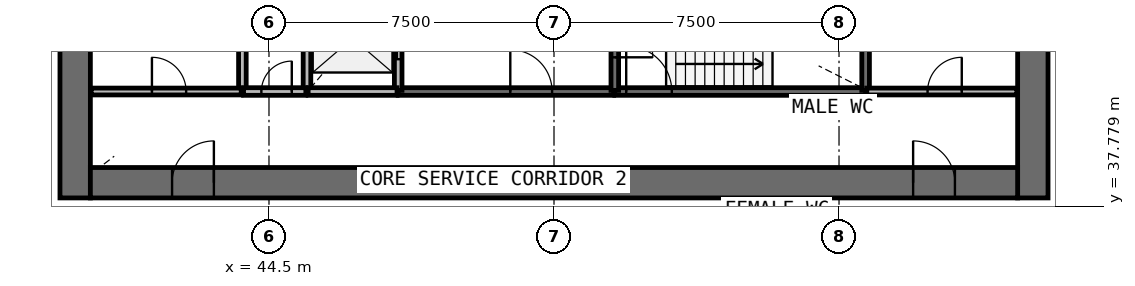
"""IFC4 building model, lengths in metres.
Left out: names, types, materials, properties, quantities, classifications, styles, units other than length and angle.
Written with IfcOpenShell. Run it as: python <this file> out.ifc"""

import sys

from ifc_helpers import new_model, si_unit, direction, frame, frame_2d, origin, place, context, subcontext, project, spatial, rectangle, extrude, source, transform, mapped, element, fill, save


model = new_model("IFC4")
c1 = context("Model", 3, precision=1e-05, world=origin(), true_north=direction((0.0, 1.0)))
c2 = subcontext(c1, "Body", "Model", "MODEL_VIEW")
j1 = project(units=[si_unit("LENGTHUNIT", "METRE"), si_unit("PLANEANGLEUNIT", "RADIAN")], contexts=[c1])
p1 = place(None, origin())
s1 = spatial("IfcSite", under=j1, at=p1, CompositionType="ELEMENT")
p2 = place(p1, origin())
s2 = spatial("IfcBuilding", under=s1, at=p2, CompositionType="ELEMENT")
p3 = place(p2, frame((0.0, 0.0, 96.2)))
s3 = spatial("IfcBuildingStorey", under=s2, at=p3, CompositionType="ELEMENT", Elevation=96.2)
p4 = place(p3, frame((64.6, 38.0, 0.0), z_axis=(0.0, 0.0, 1.0), x_axis=(0.0, 1.0, 0.0)))
e1 = element("IfcWall", 1, at=p4, inside=s3, PredefinedType="SHEAR", context=c2, shape_type="SweptSolid", body=[
    extrude(rectangle(XDim=20.0, YDim=0.8, at=frame_2d((10.0, 0.0))), origin(), (0.0, 0.0, 1.0), 4.1),
])
p5 = place(p4, frame((9.1, 0.0, 0.0)))
e2 = element("IfcOpeningElement", 2, at=p5, cuts=e1, PredefinedType="OPENING", context=c2, shape_type="SweptSolid", body=[
    extrude(rectangle(XDim=1.8, YDim=2.1, at=frame_2d((0.9, 1.05))), frame((0.0, 0.41, 0.0), z_axis=(0.0, -1.0, 0.0), x_axis=(1.0, 0.0, 0.0)), (0.0, 0.0, 1.0), 0.82),
])
p6 = place(p3, frame((39.4, 58.0, 0.0), z_axis=(0.0, 0.0, 1.0), x_axis=(0.0, -1.0, 0.0)))
e3 = element("IfcWall", 3, at=p6, inside=s3, PredefinedType="SHEAR", context=c2, shape_type="SweptSolid", body=[
    extrude(rectangle(XDim=20.0, YDim=0.8, at=frame_2d((10.0, 0.0))), origin(), (0.0, 0.0, 1.0), 4.1),
])
p7 = place(p6, frame((9.1, 0.0, 0.0)))
e4 = element("IfcOpeningElement", 4, at=p7, cuts=e3, PredefinedType="OPENING", context=c2, shape_type="SweptSolid", body=[
    extrude(rectangle(XDim=1.8, YDim=2.1, at=frame_2d((0.9, 1.05))), frame((0.0, 0.41, 0.0), z_axis=(0.0, -1.0, 0.0), x_axis=(1.0, 0.0, 0.0)), (0.0, 0.0, 1.0), 0.82),
])
p8 = place(p3, frame((39.8, 38.4, 0.0), z_axis=(0.0, 0.0, 1.0), x_axis=(1.0, 0.0, 0.0)))
e5 = element("IfcWall", 5, at=p8, inside=s3, PredefinedType="SHEAR", context=c2, shape_type="SweptSolid", body=[
    extrude(rectangle(XDim=24.4, YDim=0.8, at=frame_2d((12.2, 0.0))), origin(), (0.0, 0.0, 1.0), 4.1),
])
p9 = place(p8, frame((21.65, 0.0, 0.0)))
e6 = element("IfcOpeningElement", 6, at=p9, cuts=e5, PredefinedType="OPENING", context=c2, shape_type="SweptSolid", body=[
    extrude(rectangle(XDim=1.1, YDim=2.1, at=frame_2d((0.55, 1.05))), frame((0.0, 0.41, 0.0), z_axis=(0.0, -1.0, 0.0), x_axis=(1.0, 0.0, 0.0)), (0.0, 0.0, 1.0), 0.82),
])
p10 = place(p8, frame((2.15, 0.0, 0.0)))
e7 = element("IfcOpeningElement", 7, at=p10, cuts=e5, PredefinedType="OPENING", context=c2, shape_type="SweptSolid", body=[
    extrude(rectangle(XDim=1.1, YDim=2.1, at=frame_2d((0.55, 1.05))), frame((0.0, 0.41, 0.0), z_axis=(0.0, -1.0, 0.0), x_axis=(1.0, 0.0, 0.0)), (0.0, 0.0, 1.0), 0.82),
])
p11 = place(p3, frame((53.6, 40.8, 0.0), z_axis=(0.0, 0.0, 1.0), x_axis=(1.0, 0.0, 0.0)))
e8 = element("IfcWall", 8, at=p11, inside=s3, PredefinedType="SOLIDWALL", context=c2, shape_type="SweptSolid", body=[
    extrude(rectangle(XDim=6.6, YDim=0.2, at=frame_2d((3.3, 0.0))), origin(), (0.0, 0.0, 1.0), 3.7),
])
p12 = place(p11, frame((0.3, 0.0, 0.0)))
e9 = element("IfcOpeningElement", 9, at=p12, cuts=e8, PredefinedType="OPENING", context=c2, shape_type="SweptSolid", body=[
    extrude(rectangle(XDim=1.2, YDim=2.1, at=frame_2d((0.6, 1.05))), frame((0.0, 0.11, 0.0), z_axis=(0.0, -1.0, 0.0), x_axis=(1.0, 0.0, 0.0)), (0.0, 0.0, 1.0), 0.22),
])
p13 = place(p3, frame((47.9, 40.8, 0.0), z_axis=(0.0, 0.0, 1.0), x_axis=(1.0, 0.0, 0.0)))
e10 = element("IfcWall", 10, at=p13, inside=s3, PredefinedType="SOLIDWALL", context=c2, shape_type="SweptSolid", body=[
    extrude(rectangle(XDim=5.67, YDim=0.2, at=frame_2d((2.835, 0.0))), origin(), (0.0, 0.0, 1.0), 3.7),
])
p14 = place(p13, frame((2.95, 0.0, 0.0)))
e11 = element("IfcOpeningElement", 11, at=p14, cuts=e10, PredefinedType="OPENING", context=c2, shape_type="SweptSolid", body=[
    extrude(rectangle(XDim=1.1, YDim=2.1, at=frame_2d((0.55, 1.05))), frame((0.0, 0.11, 0.0), z_axis=(0.0, -1.0, 0.0), x_axis=(1.0, 0.0, 0.0)), (0.0, 0.0, 1.0), 0.22),
])
for number, where, z_axis, x_axis in (
    (12, (43.8, 43.6, 0.0), (0.0, 0.0, 1.0), (0.0, -1.0, 0.0)),
    (13, (45.5, 43.6, 0.0), (0.0, 0.0, 1.0), (0.0, -1.0, 0.0)),
):
    element("IfcWall", number, at=place(p3, frame(where, z_axis=z_axis, x_axis=x_axis)), inside=s3, PredefinedType="SOLIDWALL", context=c2, shape_type="SweptSolid", body=[
        extrude(rectangle(XDim=2.8, YDim=0.2, at=frame_2d((1.4, 0.0))), origin(), (0.0, 0.0, 1.0), 3.7),
    ])
p15 = place(p3, frame((47.9, 40.83, 0.0), z_axis=(0.0, 0.0, 1.0), x_axis=(0.0, 1.0, 0.0)))
e14 = element("IfcWall", 14, at=p15, inside=s3, PredefinedType="SOLIDWALL", context=c2, shape_type="SweptSolid", body=[
    extrude(rectangle(XDim=2.77, YDim=0.2, at=frame_2d((1.385, 0.0))), origin(), (0.0, 0.0, 1.0), 3.7),
])
p16 = place(p15, frame((0.82, 0.0, 0.0)))
e15 = element("IfcOpeningElement", 15, at=p16, cuts=e14, PredefinedType="OPENING", context=c2, shape_type="SweptSolid", body=[
    extrude(rectangle(XDim=1.1, YDim=2.1, at=frame_2d((0.55, 1.05))), frame((0.0, 0.11, 0.0), z_axis=(0.0, -1.0, 0.0), x_axis=(1.0, 0.0, 0.0)), (0.0, 0.0, 1.0), 0.22),
])
p17 = place(p3, frame((60.2, 40.83, 0.0), z_axis=(0.0, 0.0, 1.0), x_axis=(0.0, 1.0, 0.0)))
e16 = element("IfcWall", 16, at=p17, inside=s3, PredefinedType="SOLIDWALL", context=c2, shape_type="SweptSolid", body=[
    extrude(rectangle(XDim=2.77, YDim=0.2, at=frame_2d((1.385, 0.0))), origin(), (0.0, 0.0, 1.0), 3.7),
])
p18 = place(p3, frame((53.6, 43.6, 0.0), z_axis=(0.0, 0.0, 1.0), x_axis=(0.0, -1.0, 0.0)))
e17 = element("IfcWall", 17, at=p18, inside=s3, PredefinedType="SOLIDWALL", context=c2, shape_type="SweptSolid", body=[
    extrude(rectangle(XDim=2.77, YDim=0.2, at=frame_2d((1.385, 0.0))), origin(), (0.0, 0.0, 1.0), 3.7),
])
p19 = place(p18, frame((0.9, 0.0, 0.0)))
e18 = element("IfcOpeningElement", 18, at=p19, cuts=e17, PredefinedType="OPENING", context=c2, shape_type="SweptSolid", body=[
    extrude(rectangle(XDim=1.0, YDim=2.1, at=frame_2d((0.5, 1.05))), frame((0.0, 0.11, 0.0), z_axis=(0.0, -1.0, 0.0), x_axis=(1.0, 0.0, 0.0)), (0.0, 0.0, 1.0), 0.22),
])
p20 = place(p3, frame((45.53, 40.8, 0.0), z_axis=(0.0, 0.0, 1.0), x_axis=(1.0, 0.0, 0.0)))
e19 = element("IfcWall", 19, at=p20, inside=s3, PredefinedType="SOLIDWALL", context=c2, shape_type="SweptSolid", body=[
    extrude(rectangle(XDim=2.34, YDim=0.2, at=frame_2d((1.17, 0.0))), origin(), (0.0, 0.0, 1.0), 3.7),
])
p21 = place(p3, frame((43.83, 40.8, 0.0), z_axis=(0.0, 0.0, 1.0), x_axis=(1.0, 0.0, 0.0)))
e20 = element("IfcWall", 20, at=p21, inside=s3, PredefinedType="SOLIDWALL", context=c2, shape_type="SweptSolid", body=[
    extrude(rectangle(XDim=1.64, YDim=0.2, at=frame_2d((0.82, 0.0))), origin(), (0.0, 0.0, 1.0), 3.7),
])
p22 = place(p21, frame((0.47, 0.0, 0.0)))
e21 = element("IfcOpeningElement", 21, at=p22, cuts=e20, PredefinedType="OPENING", context=c2, shape_type="SweptSolid", body=[
    extrude(rectangle(XDim=0.8, YDim=2.1, at=frame_2d((0.4, 1.05))), frame((0.0, 0.11, 0.0), z_axis=(0.0, -1.0, 0.0), x_axis=(1.0, 0.0, 0.0)), (0.0, 0.0, 1.0), 0.22),
])
p23 = place(p3, frame((60.23, 40.8, 0.0), z_axis=(0.0, 0.0, 1.0), x_axis=(1.0, 0.0, 0.0)))
e22 = element("IfcWall", 22, at=p23, inside=s3, PredefinedType="PARTITIONING", context=c2, shape_type="SweptSolid", body=[
    extrude(rectangle(XDim=3.95, YDim=0.18, at=frame_2d((1.975, 0.0))), origin(), (0.0, 0.0, 1.0), 3.7),
])
p24 = place(p23, frame((1.6, 0.0, 0.0)))
e23 = element("IfcOpeningElement", 23, at=p24, cuts=e22, PredefinedType="OPENING", context=c2, shape_type="SweptSolid", body=[
    extrude(rectangle(XDim=0.9, YDim=2.1, at=frame_2d((0.45, 1.05))), frame((0.0, 0.1, 0.0), z_axis=(0.0, -1.0, 0.0), x_axis=(1.0, 0.0, 0.0)), (0.0, 0.0, 1.0), 0.2),
])
p25 = place(p3, frame((39.82, 40.8, 0.0), z_axis=(0.0, 0.0, 1.0), x_axis=(1.0, 0.0, 0.0)))
e24 = element("IfcWall", 24, at=p25, inside=s3, PredefinedType="PARTITIONING", context=c2, shape_type="SweptSolid", body=[
    extrude(rectangle(XDim=3.95, YDim=0.18, at=frame_2d((1.975, 0.0))), origin(), (0.0, 0.0, 1.0), 3.7),
])
p26 = place(p25, frame((1.6, 0.0, 0.0)))
e25 = element("IfcOpeningElement", 25, at=p26, cuts=e24, PredefinedType="OPENING", context=c2, shape_type="SweptSolid", body=[
    extrude(rectangle(XDim=0.9, YDim=2.1, at=frame_2d((0.45, 1.05))), frame((0.0, 0.1, 0.0), z_axis=(0.0, -1.0, 0.0), x_axis=(1.0, 0.0, 0.0)), (0.0, 0.0, 1.0), 0.2),
])
m1 = source(origin(), c2, "Body", "SweptSolid", [
    extrude(rectangle(XDim=1.1, YDim=2.1, at=frame_2d((0.55, 1.05))), frame((0.0, 0.025, 0.0), z_axis=(0.0, -1.0, 0.0), x_axis=(1.0, 0.0, 0.0)), (0.0, 0.0, 1.0), 0.05),
])
p27 = place(p16, origin())
e26 = element("IfcDoor", 26, at=p27, inside=s3, OperationType="DOUBLE_DOOR_SLIDING", PredefinedType="USERDEFINED", context=c2, shape_type="MappedRepresentation", body=[
    mapped(m1, transform((0.0, 0.0, 0.0), scale=1.0)),
])
fill(e15, e26)
m2 = source(origin(), c2, "Body", "SweptSolid", [
    extrude(rectangle(XDim=1.2, YDim=2.1, at=frame_2d((0.6, 1.05))), frame((0.0, 0.025, 0.0), z_axis=(0.0, -1.0, 0.0), x_axis=(1.0, 0.0, 0.0)), (0.0, 0.0, 1.0), 0.05),
])
p28 = place(p12, origin())
e27 = element("IfcDoor", 27, at=p28, inside=s3, OperationType="SINGLE_SWING_LEFT", PredefinedType="DOOR", context=c2, shape_type="MappedRepresentation", body=[
    mapped(m2, transform((0.0, 0.0, 0.0), scale=1.0)),
])
fill(e9, e27)
m3 = source(origin(), c2, "Body", "SweptSolid", [
    extrude(rectangle(XDim=1.0, YDim=2.1, at=frame_2d((0.5, 1.05))), frame((0.0, 0.025, 0.0), z_axis=(0.0, -1.0, 0.0), x_axis=(1.0, 0.0, 0.0)), (0.0, 0.0, 1.0), 0.05),
])
p29 = place(p19, origin())
e28 = element("IfcDoor", 28, at=p29, inside=s3, OperationType="SINGLE_SWING_RIGHT", PredefinedType="DOOR", context=c2, shape_type="MappedRepresentation", body=[
    mapped(m3, transform((0.0, 0.0, 0.0), scale=1.0)),
])
fill(e18, e28)
m4 = source(origin(), c2, "Body", "SweptSolid", [
    extrude(rectangle(XDim=1.1, YDim=2.1, at=frame_2d((0.55, 1.05))), frame((0.0, 0.025, 0.0), z_axis=(0.0, -1.0, 0.0), x_axis=(1.0, 0.0, 0.0)), (0.0, 0.0, 1.0), 0.05),
])
p30 = place(p14, origin())
e29 = element("IfcDoor", 29, at=p30, inside=s3, OperationType="SINGLE_SWING_LEFT", PredefinedType="DOOR", context=c2, shape_type="MappedRepresentation", body=[
    mapped(m4, transform((0.0, 0.0, 0.0), scale=1.0)),
])
fill(e11, e29)
m5 = source(origin(), c2, "Body", "SweptSolid", [
    extrude(rectangle(XDim=0.8, YDim=2.1, at=frame_2d((0.4, 1.05))), frame((0.0, 0.025, 0.0), z_axis=(0.0, -1.0, 0.0), x_axis=(1.0, 0.0, 0.0)), (0.0, 0.0, 1.0), 0.05),
])
p31 = place(p22, origin())
e30 = element("IfcDoor", 30, at=p31, inside=s3, OperationType="SINGLE_SWING_RIGHT", PredefinedType="DOOR", context=c2, shape_type="MappedRepresentation", body=[
    mapped(m5, transform((0.0, 0.0, 0.0), scale=1.0)),
])
fill(e21, e30)
m6 = source(origin(), c2, "Body", "SweptSolid", [
    extrude(rectangle(XDim=1.1, YDim=2.1, at=frame_2d((0.55, 1.05))), frame((0.0, 0.025, 0.0), z_axis=(0.0, -1.0, 0.0), x_axis=(1.0, 0.0, 0.0)), (0.0, 0.0, 1.0), 0.05),
])
p32 = place(p9, origin())
e31 = element("IfcDoor", 31, at=p32, inside=s3, OperationType="SINGLE_SWING_LEFT", PredefinedType="DOOR", context=c2, shape_type="MappedRepresentation", body=[
    mapped(m6, transform((0.0, 0.0, 0.0), scale=1.0)),
])
fill(e6, e31)
p33 = place(p10, origin())
e32 = element("IfcDoor", 32, at=p33, inside=s3, OperationType="SINGLE_SWING_RIGHT", PredefinedType="DOOR", context=c2, shape_type="MappedRepresentation", body=[
    mapped(m6, transform((0.0, 0.0, 0.0), scale=1.0)),
])
fill(e7, e32)
m7 = source(origin(), c2, "Body", "SweptSolid", [
    extrude(rectangle(XDim=0.9, YDim=2.1, at=frame_2d((0.45, 1.05))), frame((0.0, 0.025, 0.0), z_axis=(0.0, -1.0, 0.0), x_axis=(1.0, 0.0, 0.0)), (0.0, 0.0, 1.0), 0.05),
])
p34 = place(p26, origin())
e33 = element("IfcDoor", 33, at=p34, inside=s3, OperationType="SINGLE_SWING_LEFT", PredefinedType="DOOR", context=c2, shape_type="MappedRepresentation", body=[
    mapped(m7, transform((0.0, 0.0, 0.0), scale=1.0)),
])
fill(e25, e33)
p35 = place(p24, origin())
e34 = element("IfcDoor", 34, at=p35, inside=s3, OperationType="SINGLE_SWING_RIGHT", PredefinedType="DOOR", context=c2, shape_type="MappedRepresentation", body=[
    mapped(m7, transform((0.0, 0.0, 0.0), scale=1.0)),
])
fill(e23, e34)
save(model, sys.argv[1])
